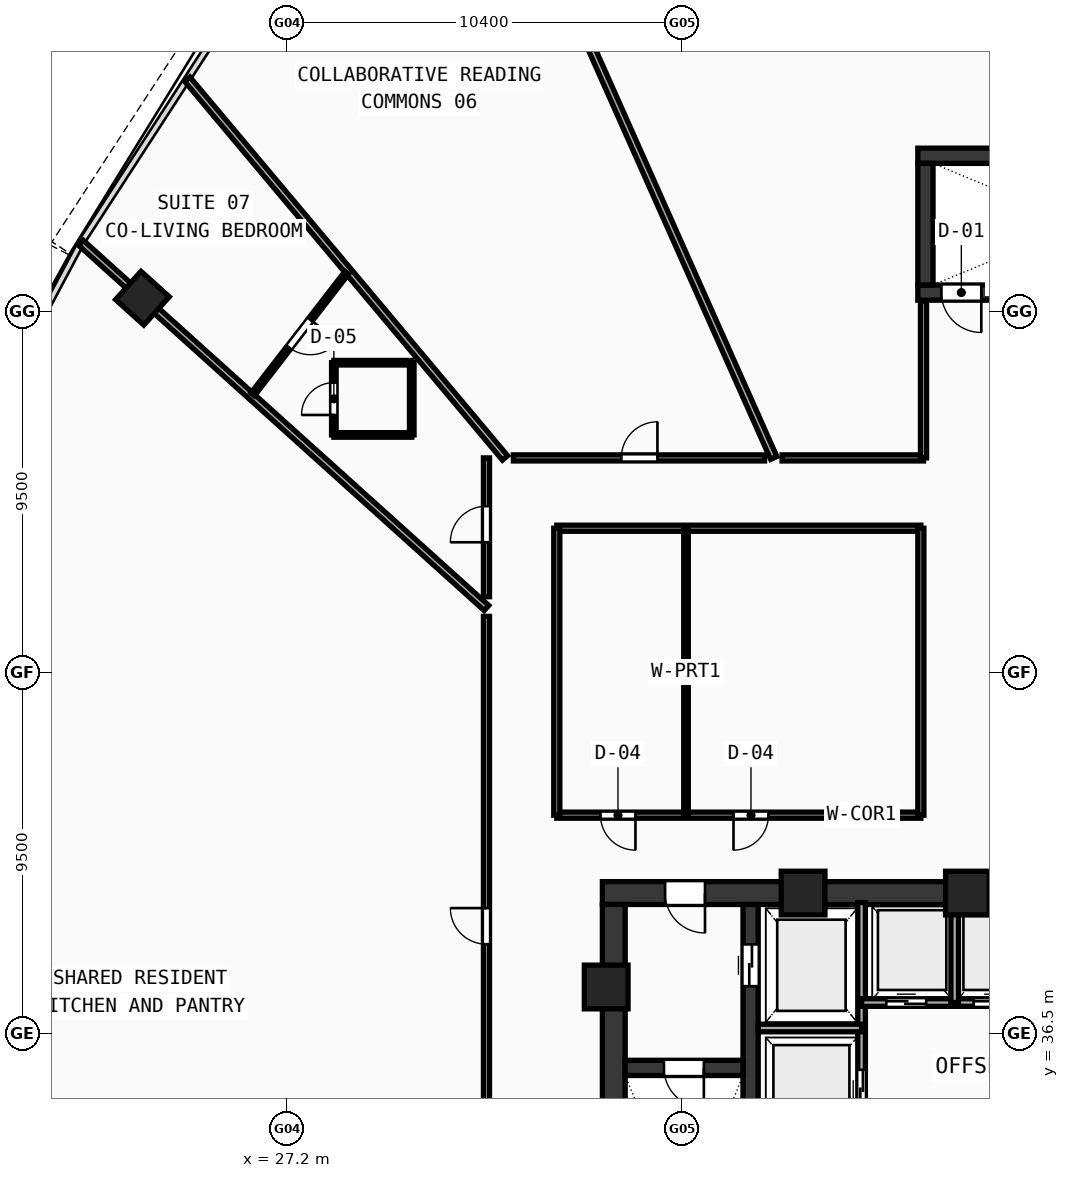
"""IFC4 building model, lengths in metres.
Left out: names, types, materials, properties, quantities, classifications, styles, units other than length and angle.
Written with IfcOpenShell. Run it as: python <this file> out.ifc"""

import sys

from ifc_helpers import new_model, si_unit, direction, frame, frame_2d, origin, origin_with_axes, origin_2d, place, context, subcontext, project, spatial, rectangle, hollow_rectangle, extrude, source, transform, mapped, element, fill, save


model = new_model("IFC4")
c1 = context("Model", 3, precision=1e-05, world=origin(), true_north=direction((0.0, 1.0)))
c2 = subcontext(c1, "Body", "Model", "MODEL_VIEW")
j1 = project(units=[si_unit("LENGTHUNIT", "METRE"), si_unit("PLANEANGLEUNIT", "RADIAN")], contexts=[c1])
p1 = place(None, origin())
s1 = spatial("IfcSite", under=j1, at=p1, CompositionType="ELEMENT")
p2 = place(p1, origin())
s2 = spatial("IfcBuilding", under=s1, at=p2, CompositionType="ELEMENT")
p3 = place(p2, frame((0.0, 0.0, 81.18)))
s3 = spatial("IfcBuildingStorey", under=s2, at=p3, CompositionType="ELEMENT", Elevation=81.18)
p4 = place(p3, frame((35.5, 40.2, 0.0), z_axis=(0.0, 0.0, 1.0), x_axis=(1.0, 0.0, 0.0)))
e1 = element("IfcWall", 1, at=p4, inside=s3, PredefinedType="SHEAR", context=c2, shape_type="SweptSolid", body=[
    extrude(rectangle(XDim=11.3, YDim=0.6, at=frame_2d((5.65, 0.0))), origin(), (0.0, 0.0, 1.0), 3.54),
])
p5 = place(p4, frame((1.65, 0.0, 0.0)))
e2 = element("IfcOpeningElement", 2, at=p5, cuts=e1, PredefinedType="OPENING", context=c2, shape_type="SweptSolid", body=[
    extrude(rectangle(XDim=1.05, YDim=2.1, at=frame_2d((0.525, 1.05))), frame((0.0, 0.31, 0.0), z_axis=(0.0, -1.0, 0.0), x_axis=(1.0, 0.0, 0.0)), (0.0, 0.0, 1.0), 0.62),
])
p6 = place(p3, frame((35.8, 27.8, 0.0), z_axis=(0.0, 0.0, 1.0), x_axis=(0.0, 1.0, 0.0)))
e3 = element("IfcWall", 3, at=p6, inside=s3, PredefinedType="SHEAR", context=c2, shape_type="SweptSolid", body=[
    extrude(rectangle(XDim=12.1, YDim=0.6, at=frame_2d((6.05, 0.0))), origin(), (0.0, 0.0, 1.0), 3.54),
])
p7 = place(p3, frame((39.4, 27.8, 0.0), z_axis=(0.0, 0.0, 1.0), x_axis=(0.0, 1.0, 0.0)))
e4 = element("IfcWall", 4, at=p7, inside=s3, PredefinedType="SHEAR", context=c2, shape_type="SweptSolid", body=[
    extrude(rectangle(XDim=12.1, YDim=0.4, at=frame_2d((6.05, 0.0))), origin(), (0.0, 0.0, 1.0), 3.54),
])
p8 = place(p7, frame((9.95, 0.0, 0.0)))
e5 = element("IfcOpeningElement", 5, at=p8, cuts=e4, PredefinedType="OPENING", context=c2, shape_type="SweptSolid", body=[
    extrude(rectangle(XDim=1.1, YDim=2.1, at=frame_2d((0.55, 1.05))), frame((0.0, 0.21, 0.0), z_axis=(0.0, -1.0, 0.0), x_axis=(1.0, 0.0, 0.0)), (0.0, 0.0, 1.0), 0.42),
])
p9 = place(p3, frame((36.1, 35.6, 0.0), z_axis=(0.0, 0.0, 1.0), x_axis=(1.0, 0.0, 0.0)))
e6 = element("IfcWall", 6, at=p9, inside=s3, PredefinedType="SHEAR", context=c2, shape_type="SweptSolid", body=[
    extrude(rectangle(XDim=3.1, YDim=0.4, at=frame_2d((1.55, 0.0))), origin(), (0.0, 0.0, 1.0), 3.54),
])
p10 = place(p9, frame((1.02, 0.0, 0.0)))
e7 = element("IfcOpeningElement", 7, at=p10, cuts=e6, PredefinedType="OPENING", context=c2, shape_type="SweptSolid", body=[
    extrude(rectangle(XDim=1.05, YDim=2.1, at=frame_2d((0.525, 1.05))), frame((0.0, 0.21, 0.0), z_axis=(0.0, -1.0, 0.0), x_axis=(1.0, 0.0, 0.0)), (0.0, 0.0, 1.0), 0.42),
])
p11 = place(p3, frame((43.8, 59.6, 0.0), z_axis=(0.0, 0.0, 1.0), x_axis=(1.0, 0.0, 0.0)))
e8 = element("IfcWall", 8, at=p11, inside=s3, PredefinedType="SHEAR", context=c2, shape_type="SweptSolid", body=[
    extrude(rectangle(XDim=8.5, YDim=0.4, at=frame_2d((4.25, 0.0))), origin(), (0.0, 0.0, 1.0), 3.54),
])
p12 = place(p3, frame((43.8, 56.0, 0.0), z_axis=(0.0, 0.0, 1.0), x_axis=(1.0, 0.0, 0.0)))
e9 = element("IfcWall", 9, at=p12, inside=s3, PredefinedType="SHEAR", context=c2, shape_type="SweptSolid", body=[
    extrude(rectangle(XDim=8.5, YDim=0.4, at=frame_2d((4.25, 0.0))), origin(), (0.0, 0.0, 1.0), 3.54),
])
p13 = place(p12, frame((0.62, 0.0, 0.0)))
e10 = element("IfcOpeningElement", 10, at=p13, cuts=e9, PredefinedType="OPENING", context=c2, shape_type="SweptSolid", body=[
    extrude(rectangle(XDim=1.05, YDim=2.1, at=frame_2d((0.525, 1.05))), frame((0.0, 0.21, 0.0), z_axis=(0.0, -1.0, 0.0), x_axis=(1.0, 0.0, 0.0)), (0.0, 0.0, 1.0), 0.42),
])
p14 = place(p3, frame((44.0, 56.2, 0.0), z_axis=(0.0, 0.0, 1.0), x_axis=(0.0, 1.0, 0.0)))
e11 = element("IfcWall", 11, at=p14, inside=s3, PredefinedType="SHEAR", context=c2, shape_type="SweptSolid", body=[
    extrude(rectangle(XDim=3.2, YDim=0.4, at=frame_2d((1.6, 0.0))), origin(), (0.0, 0.0, 1.0), 3.54),
])
m1 = source(origin(), c2, "Body", "SweptSolid", [
    extrude(hollow_rectangle(XDim=1.15, YDim=1.15, WallThickness=0.048, at=origin_2d()), origin(), (0.0, 0.0, 1.0), 3.8),
])
for number, where, z_axis, x_axis in (
    (12, (45.106, 40.2, -0.26), (0.0, 0.0, 1.0), (1.0, 0.0, 0.0)),
    (13, (40.781, 40.2, -0.26), (0.0, 0.0, 1.0), (1.0, 0.0, 0.0)),
    (14, (35.6, 37.729, -0.26), (0.0, 0.0, 1.0), (1.0, 0.0, 0.0)),
):
    element("IfcColumn", number, at=place(p3, frame(where, z_axis=z_axis, x_axis=x_axis)), inside=s3, PredefinedType="COLUMN", context=c2, shape_type="MappedRepresentation", body=[
        mapped(m1, transform((0.0, 0.0, 0.0), scale=1.0)),
    ])
m2 = source(origin(), c2, "Body", "SweptSolid", [
    extrude(hollow_rectangle(XDim=1.0, YDim=1.0, WallThickness=0.042, at=origin_2d()), origin(), (0.0, 0.0, 1.0), 3.8),
])
p15 = place(p3, frame((23.397, 55.852, -0.26), z_axis=(0.0, 0.0, 1.0), x_axis=(-0.669130606359, -0.743144825477, 0.0)))
e15 = element("IfcColumn", 15, at=p15, inside=s3, PredefinedType="COLUMN", context=c2, shape_type="MappedRepresentation", body=[
    mapped(m2, transform((0.0, 0.0, 0.0), scale=1.0)),
])
p16 = place(p3, frame((42.32, 33.5, 0.0), z_axis=(0.0, 0.0, 1.0), x_axis=(0.0, 1.0, 0.0)))
e16 = element("IfcWall", 16, at=p16, inside=s3, PredefinedType="SOLIDWALL", context=c2, shape_type="SweptSolid", body=[
    extrude(rectangle(XDim=6.45, YDim=0.2, at=frame_2d((3.225, 0.0))), origin(), (0.0, 0.0, 1.0), 3.54),
])
p17 = place(p16, frame((1.0, 0.0, 0.0)))
e17 = element("IfcOpeningElement", 17, at=p17, cuts=e16, PredefinedType="OPENING", context=c2, shape_type="SweptSolid", body=[
    extrude(rectangle(XDim=1.05, YDim=2.1, at=frame_2d((0.525, 1.05))), frame((0.0, 0.11, 0.0), z_axis=(0.0, -1.0, 0.0), x_axis=(1.0, 0.0, 0.0)), (0.0, 0.0, 1.0), 0.22),
])
p18 = place(p3, frame((39.6, 36.65, 0.0), z_axis=(0.0, 0.0, 1.0), x_axis=(1.0, 0.0, 0.0)))
e18 = element("IfcWall", 18, at=p18, inside=s3, PredefinedType="SOLIDWALL", context=c2, shape_type="SweptSolid", body=[
    extrude(rectangle(XDim=2.72, YDim=0.2, at=frame_2d((1.36, 0.0))), origin(), (0.0, 0.0, 1.0), 3.54),
])
p19 = place(p3, frame((42.32, 37.32, 0.0), z_axis=(0.0, 0.0, 1.0), x_axis=(1.0, 0.0, 0.0)))
e19 = element("IfcWall", 19, at=p19, inside=s3, PredefinedType="SOLIDWALL", context=c2, shape_type="SweptSolid", body=[
    extrude(rectangle(XDim=4.73, YDim=0.2, at=frame_2d((2.365, 0.0))), origin(), (0.0, 0.0, 1.0), 3.54),
])
p20 = place(p19, frame((0.65, 0.0, 0.0)))
e20 = element("IfcOpeningElement", 20, at=p20, cuts=e19, PredefinedType="OPENING", context=c2, shape_type="SweptSolid", body=[
    extrude(rectangle(XDim=1.05, YDim=2.1, at=frame_2d((0.525, 1.05))), frame((0.0, 0.11, 0.0), z_axis=(0.0, -1.0, 0.0), x_axis=(1.0, 0.0, 0.0)), (0.0, 0.0, 1.0), 0.22),
])
p21 = place(p19, frame((2.95, 0.0, 0.0)))
e21 = element("IfcOpeningElement", 21, at=p21, cuts=e19, PredefinedType="OPENING", context=c2, shape_type="SweptSolid", body=[
    extrude(rectangle(XDim=1.05, YDim=2.1, at=frame_2d((0.525, 1.05))), frame((0.0, 0.11, 0.0), z_axis=(0.0, -1.0, 0.0), x_axis=(1.0, 0.0, 0.0)), (0.0, 0.0, 1.0), 0.22),
])
p22 = place(p3, frame((44.77, 37.32, 0.0), z_axis=(0.0, 0.0, 1.0), x_axis=(0.0, 1.0, 0.0)))
e22 = element("IfcWall", 22, at=p22, inside=s3, PredefinedType="SOLIDWALL", context=c2, shape_type="SweptSolid", body=[
    extrude(rectangle(XDim=2.63, YDim=0.2, at=frame_2d((1.315, 0.0))), origin(), (0.0, 0.0, 1.0), 3.54),
])
p23 = place(p3, frame((34.3, 42.25, 0.0), z_axis=(0.0, 0.0, 1.0), x_axis=(1.0, 0.0, 0.0)))
e23 = element("IfcWall", 23, at=p23, inside=s3, PredefinedType="PARTITIONING", context=c2, shape_type="SweptSolid", body=[
    extrude(rectangle(XDim=9.58, YDim=0.16, at=frame_2d((4.79, 0.0))), origin(), (0.0, 0.0, 1.0), 2.84),
])
p24 = place(p23, frame((1.15, 0.0, 0.0)))
e24 = element("IfcOpeningElement", 24, at=p24, cuts=e23, PredefinedType="OPENING", context=c2, shape_type="SweptSolid", body=[
    extrude(rectangle(XDim=0.92, YDim=2.1, at=frame_2d((0.46, 1.05))), frame((0.0, 0.09, 0.0), z_axis=(0.0, -1.0, 0.0), x_axis=(1.0, 0.0, 0.0)), (0.0, 0.0, 1.0), 0.18),
])
p25 = place(p23, frame((4.65, 0.0, 0.0)))
e25 = element("IfcOpeningElement", 25, at=p25, cuts=e23, PredefinedType="OPENING", context=c2, shape_type="SweptSolid", body=[
    extrude(rectangle(XDim=0.92, YDim=2.1, at=frame_2d((0.46, 1.05))), frame((0.0, 0.09, 0.0), z_axis=(0.0, -1.0, 0.0), x_axis=(1.0, 0.0, 0.0)), (0.0, 0.0, 1.0), 0.18),
])
p26 = place(p3, frame((34.3, 49.8, 0.0), z_axis=(0.0, 0.0, 1.0), x_axis=(1.0, 0.0, 0.0)))
e26 = element("IfcWall", 26, at=p26, inside=s3, PredefinedType="PARTITIONING", context=c2, shape_type="SweptSolid", body=[
    extrude(rectangle(XDim=9.58, YDim=0.16, at=frame_2d((4.79, 0.0))), origin(), (0.0, 0.0, 1.0), 2.84),
])
for number, where, z_axis, x_axis in (
    (27, (34.3, 42.25, 0.0), (0.0, 0.0, 1.0), (0.0, 1.0, 0.0)),
    (28, (43.88, 42.25, 0.0), (0.0, 0.0, 1.0), (0.0, 1.0, 0.0)),
):
    element("IfcWall", number, at=place(p3, frame(where, z_axis=z_axis, x_axis=x_axis)), inside=s3, PredefinedType="PARTITIONING", context=c2, shape_type="SweptSolid", body=[
        extrude(rectangle(XDim=7.55, YDim=0.16, at=frame_2d((3.775, 0.0))), origin(), (0.0, 0.0, 1.0), 2.84),
    ])
p27 = place(p3, frame((37.7, 42.25, 0.0), z_axis=(0.0, 0.0, 1.0), x_axis=(0.0, 1.0, 0.0)))
e29 = element("IfcWall", 29, at=p27, inside=s3, PredefinedType="PARTITIONING", context=c2, shape_type="SweptSolid", body=[
    extrude(rectangle(XDim=7.55, YDim=0.12, at=frame_2d((3.775, 0.0))), origin(), (0.0, 0.0, 1.0), 2.84),
])
p28 = place(p3, frame((40.008, 51.65, 0.0), z_axis=(0.0, 0.0, 1.0), x_axis=(-0.406733854264, 0.913546699296, 0.0)))
e30 = element("IfcWall", 30, at=p28, inside=s3, PredefinedType="PARTITIONING", context=c2, shape_type="SweptSolid", body=[
    extrude(rectangle(XDim=21.911, YDim=0.18, at=frame_2d((10.956, 0.0))), origin(), (0.0, 0.0, 1.0), 2.84),
])
p29 = place(p3, frame((32.938, 51.65, 0.0), z_axis=(0.0, 0.0, 1.0), x_axis=(-0.642792408097, 0.766040416749, 0.0)))
e31 = element("IfcWall", 31, at=p29, inside=s3, PredefinedType="PARTITIONING", context=c2, shape_type="SweptSolid", body=[
    extrude(rectangle(XDim=13.01, YDim=0.18, at=frame_2d((6.505, 0.0))), origin(), (0.0, 0.0, 1.0), 2.84),
])
p30 = place(p3, frame((32.45, 47.701, 0.0), z_axis=(0.0, 0.0, 1.0), x_axis=(-0.743147852162, 0.66912724487, 0.0)))
e32 = element("IfcWall", 32, at=p30, inside=s3, PredefinedType="PARTITIONING", context=c2, shape_type="SweptSolid", body=[
    extrude(rectangle(XDim=14.357, YDim=0.18, at=frame_2d((7.179, 0.0))), origin(), (0.0, 0.0, 1.0), 2.84),
])
p31 = place(p3, frame((32.45, 31.178, 0.0), z_axis=(0.0, 0.0, 1.0), x_axis=(0.0, 1.0, 0.0)))
e33 = element("IfcWall", 33, at=p31, inside=s3, PredefinedType="PARTITIONING", context=c2, shape_type="SweptSolid", body=[
    extrude(rectangle(XDim=16.304, YDim=0.16, at=frame_2d((8.152, 0.0))), origin(), (0.0, 0.0, 1.0), 2.84),
])
p32 = place(p31, frame((7.677, 0.0, 0.0)))
e34 = element("IfcOpeningElement", 34, at=p32, cuts=e33, PredefinedType="OPENING", context=c2, shape_type="SweptSolid", body=[
    extrude(rectangle(XDim=0.95, YDim=2.1, at=frame_2d((0.475, 1.05))), frame((0.0, 0.09, 0.0), z_axis=(0.0, -1.0, 0.0), x_axis=(1.0, 0.0, 0.0)), (0.0, 0.0, 1.0), 0.18),
])
p33 = place(p3, frame((32.45, 47.997, 0.0), z_axis=(0.0, 0.0, 1.0), x_axis=(0.0, 1.0, 0.0)))
e35 = element("IfcWall", 35, at=p33, inside=s3, PredefinedType="PARTITIONING", context=c2, shape_type="SweptSolid", body=[
    extrude(rectangle(XDim=3.653, YDim=0.16, at=frame_2d((1.826, 0.0))), origin(), (0.0, 0.0, 1.0), 3.54),
])
p34 = place(p33, frame((1.433, 0.0, 0.0)))
e36 = element("IfcOpeningElement", 36, at=p34, cuts=e35, PredefinedType="OPENING", context=c2, shape_type="SweptSolid", body=[
    extrude(rectangle(XDim=0.95, YDim=2.1, at=frame_2d((0.475, 1.05))), frame((0.0, 0.09, 0.0), z_axis=(0.0, -1.0, 0.0), x_axis=(1.0, 0.0, 0.0)), (0.0, 0.0, 1.0), 0.18),
])
p35 = place(p3, frame((33.158, 51.65, 0.0), z_axis=(0.0, 0.0, 1.0), x_axis=(1.0, 0.0, 0.0)))
e37 = element("IfcWall", 37, at=p35, inside=s3, PredefinedType="PARTITIONING", context=c2, shape_type="SweptSolid", body=[
    extrude(rectangle(XDim=6.609, YDim=0.16, at=frame_2d((3.305, 0.0))), origin(), (0.0, 0.0, 1.0), 3.54),
])
p36 = place(p35, frame((2.84, 0.0, 0.0)))
e38 = element("IfcOpeningElement", 38, at=p36, cuts=e37, PredefinedType="OPENING", context=c2, shape_type="SweptSolid", body=[
    extrude(rectangle(XDim=0.95, YDim=2.1, at=frame_2d((0.475, 1.05))), frame((0.0, 0.09, 0.0), z_axis=(0.0, -1.0, 0.0), x_axis=(1.0, 0.0, 0.0)), (0.0, 0.0, 1.0), 0.18),
])
p37 = place(p3, frame((40.228, 51.65, 0.0), z_axis=(0.0, 0.0, 1.0), x_axis=(1.0, 0.0, 0.0)))
e39 = element("IfcWall", 39, at=p37, inside=s3, PredefinedType="PARTITIONING", context=c2, shape_type="SweptSolid", body=[
    extrude(rectangle(XDim=3.722, YDim=0.16, at=frame_2d((1.861, 0.0))), origin(), (0.0, 0.0, 1.0), 2.84),
])
p38 = place(p3, frame((43.95, 51.65, 0.0), z_axis=(0.0, 0.0, 1.0), x_axis=(0.0, 1.0, 0.0)))
e40 = element("IfcWall", 40, at=p38, inside=s3, PredefinedType="PARTITIONING", context=c2, shape_type="SweptSolid", body=[
    extrude(rectangle(XDim=4.13, YDim=0.16, at=frame_2d((2.065, 0.0))), origin(), (0.0, 0.0, 1.0), 3.54),
])
p39 = place(p3, frame((28.434, 52.255, 0.0), z_axis=(0.0, 0.0, 1.0), x_axis=(1.0, 0.0, 0.0)))
e41 = element("IfcWall", 41, at=p39, inside=s3, PredefinedType="PARTITIONING", context=c2, shape_type="SweptSolid", body=[
    extrude(rectangle(XDim=2.05, YDim=0.12, at=frame_2d((1.025, 0.0))), origin(), (0.0, 0.0, 1.0), 3.14),
])
p40 = place(p3, frame((30.484, 52.255, 0.0), z_axis=(0.0, 0.0, 1.0), x_axis=(0.0, 1.0, 0.0)))
e42 = element("IfcWall", 42, at=p40, inside=s3, PredefinedType="PARTITIONING", context=c2, shape_type="SweptSolid", body=[
    extrude(rectangle(XDim=1.9, YDim=0.12, at=frame_2d((0.95, 0.0))), origin(), (0.0, 0.0, 1.0), 3.14),
])
p41 = place(p3, frame((30.484, 54.155, 0.0), z_axis=(0.0, 0.0, 1.0), x_axis=(-1.0, 0.0, 0.0)))
e43 = element("IfcWall", 43, at=p41, inside=s3, PredefinedType="PARTITIONING", context=c2, shape_type="SweptSolid", body=[
    extrude(rectangle(XDim=2.05, YDim=0.12, at=frame_2d((1.025, 0.0))), origin(), (0.0, 0.0, 1.0), 3.54),
])
p42 = place(p3, frame((28.434, 54.155, 0.0), z_axis=(0.0, 0.0, 1.0), x_axis=(0.0, -1.0, 0.0)))
e44 = element("IfcWall", 44, at=p42, inside=s3, PredefinedType="PARTITIONING", context=c2, shape_type="SweptSolid", body=[
    extrude(rectangle(XDim=1.9, YDim=0.12, at=frame_2d((0.95, 0.0))), origin(), (0.0, 0.0, 1.0), 3.54),
])
p43 = place(p42, frame((0.525, 0.0, 0.0)))
e45 = element("IfcOpeningElement", 45, at=p43, cuts=e44, PredefinedType="OPENING", context=c2, shape_type="SweptSolid", body=[
    extrude(rectangle(XDim=0.85, YDim=2.1, at=frame_2d((0.425, 1.05))), frame((0.0, 0.07, 0.0), z_axis=(0.0, -1.0, 0.0), x_axis=(1.0, 0.0, 0.0)), (0.0, 0.0, 1.0), 0.14),
])
p44 = place(p3, frame((28.772, 56.521, 0.0), z_axis=(0.0, 0.0, 1.0), x_axis=(-0.611610665825, -0.791158892669, 0.0)))
e46 = element("IfcWall", 46, at=p44, inside=s3, PredefinedType="PARTITIONING", context=c2, shape_type="SweptSolid", body=[
    extrude(rectangle(XDim=4.045, YDim=0.12, at=frame_2d((2.022, 0.0))), origin(), (0.0, 0.0, 1.0), 2.84),
])
p45 = place(p44, frame((1.562, 0.0, 0.0)))
e47 = element("IfcOpeningElement", 47, at=p45, cuts=e46, PredefinedType="OPENING", context=c2, shape_type="SweptSolid", body=[
    extrude(rectangle(XDim=0.92, YDim=2.1, at=frame_2d((0.46, 1.05))), frame((0.0, 0.07, 0.0), z_axis=(0.0, -1.0, 0.0), x_axis=(1.0, 0.0, 0.0)), (0.0, 0.0, 1.0), 0.14),
])
m3 = source(origin(), c2, "Body", "SweptSolid", [
    extrude(rectangle(XDim=1.05, YDim=2.1, at=frame_2d((0.525, 1.05))), frame((0.0, 0.025, 0.0), z_axis=(0.0, -1.0, 0.0), x_axis=(1.0, 0.0, 0.0)), (0.0, 0.0, 1.0), 0.05),
])
p46 = place(p10, frame((1.05, 0.0, 0.0), z_axis=(0.0, 0.0, 1.0), x_axis=(-1.0, 0.0, 0.0)))
e48 = element("IfcDoor", 48, at=p46, inside=s3, OperationType="SINGLE_SWING_LEFT", PredefinedType="DOOR", context=c2, shape_type="MappedRepresentation", body=[
    mapped(m3, transform((0.0, 0.0, 0.0), scale=1.0)),
])
fill(e7, e48)
p47 = place(p5, frame((1.05, 0.0, 0.0), z_axis=(0.0, 0.0, 1.0), x_axis=(-1.0, 0.0, 0.0)))
e49 = element("IfcDoor", 49, at=p47, inside=s3, OperationType="SINGLE_SWING_LEFT", PredefinedType="DOOR", context=c2, shape_type="MappedRepresentation", body=[
    mapped(m3, transform((0.0, 0.0, 0.0), scale=1.0)),
])
fill(e2, e49)
m4 = source(origin(), c2, "Body", "SweptSolid", [
    extrude(rectangle(XDim=1.1, YDim=2.1, at=frame_2d((0.55, 1.05))), frame((0.0, 0.025, 0.0), z_axis=(0.0, -1.0, 0.0), x_axis=(1.0, 0.0, 0.0)), (0.0, 0.0, 1.0), 0.05),
])
p48 = place(p8, frame((1.1, 0.0, 0.0), z_axis=(0.0, 0.0, 1.0), x_axis=(-1.0, 0.0, 0.0)))
e50 = element("IfcDoor", 50, at=p48, inside=s3, OperationType="DOUBLE_DOOR_SLIDING", PredefinedType="DOOR", context=c2, shape_type="MappedRepresentation", body=[
    mapped(m4, transform((0.0, 0.0, 0.0), scale=1.0)),
])
fill(e5, e50)
p49 = place(p17, origin_with_axes())
e51 = element("IfcDoor", 51, at=p49, inside=s3, OperationType="DOUBLE_DOOR_SLIDING", PredefinedType="DOOR", context=c2, shape_type="MappedRepresentation", body=[
    mapped(m3, transform((0.0, 0.0, 0.0), scale=1.0)),
])
fill(e17, e51)
p50 = place(p20, frame((1.05, 0.0, 0.0), z_axis=(0.0, 0.0, 1.0), x_axis=(-1.0, 0.0, 0.0)))
e52 = element("IfcDoor", 52, at=p50, inside=s3, OperationType="DOUBLE_DOOR_SLIDING", PredefinedType="DOOR", context=c2, shape_type="MappedRepresentation", body=[
    mapped(m3, transform((0.0, 0.0, 0.0), scale=1.0)),
])
fill(e20, e52)
p51 = place(p21, frame((1.05, 0.0, 0.0), z_axis=(0.0, 0.0, 1.0), x_axis=(-1.0, 0.0, 0.0)))
e53 = element("IfcDoor", 53, at=p51, inside=s3, OperationType="DOUBLE_DOOR_SLIDING", PredefinedType="DOOR", context=c2, shape_type="MappedRepresentation", body=[
    mapped(m3, transform((0.0, 0.0, 0.0), scale=1.0)),
])
fill(e21, e53)
p52 = place(p13, frame((1.05, 0.0, 0.0), z_axis=(0.0, 0.0, 1.0), x_axis=(-1.0, 0.0, 0.0)))
e54 = element("IfcDoor", 54, at=p52, inside=s3, OperationType="SINGLE_SWING_LEFT", PredefinedType="DOOR", context=c2, shape_type="MappedRepresentation", body=[
    mapped(m3, transform((0.0, 0.0, 0.0), scale=1.0)),
])
fill(e10, e54)
m5 = source(origin(), c2, "Body", "SweptSolid", [
    extrude(rectangle(XDim=0.92, YDim=2.1, at=frame_2d((0.46, 1.05))), frame((0.0, 0.025, 0.0), z_axis=(0.0, -1.0, 0.0), x_axis=(1.0, 0.0, 0.0)), (0.0, 0.0, 1.0), 0.05),
])
p53 = place(p24, frame((0.92, 0.0, 0.0), z_axis=(0.0, 0.0, 1.0), x_axis=(-1.0, 0.0, 0.0)))
e55 = element("IfcDoor", 55, at=p53, inside=s3, OperationType="SINGLE_SWING_LEFT", PredefinedType="DOOR", context=c2, shape_type="MappedRepresentation", body=[
    mapped(m5, transform((0.0, 0.0, 0.0), scale=1.0)),
])
fill(e24, e55)
p54 = place(p25, frame((0.92, 0.0, 0.0), z_axis=(0.0, 0.0, 1.0), x_axis=(-1.0, 0.0, 0.0)))
e56 = element("IfcDoor", 56, at=p54, inside=s3, OperationType="SINGLE_SWING_RIGHT", PredefinedType="DOOR", context=c2, shape_type="MappedRepresentation", body=[
    mapped(m5, transform((0.0, 0.0, 0.0), scale=1.0)),
])
fill(e25, e56)
m6 = source(origin(), c2, "Body", "SweptSolid", [
    extrude(rectangle(XDim=0.95, YDim=2.1, at=frame_2d((0.475, 1.05))), frame((0.0, 0.025, 0.0), z_axis=(0.0, -1.0, 0.0), x_axis=(1.0, 0.0, 0.0)), (0.0, 0.0, 1.0), 0.05),
])
p55 = place(p36, origin_with_axes())
e57 = element("IfcDoor", 57, at=p55, inside=s3, OperationType="SINGLE_SWING_RIGHT", PredefinedType="DOOR", context=c2, shape_type="MappedRepresentation", body=[
    mapped(m6, transform((0.0, 0.0, 0.0), scale=1.0)),
])
fill(e38, e57)
p56 = place(p34, origin_with_axes())
e58 = element("IfcDoor", 58, at=p56, inside=s3, OperationType="SINGLE_SWING_LEFT", PredefinedType="DOOR", context=c2, shape_type="MappedRepresentation", body=[
    mapped(m6, transform((0.0, 0.0, 0.0), scale=1.0)),
])
fill(e36, e58)
m7 = source(origin(), c2, "Body", "SweptSolid", [
    extrude(rectangle(XDim=0.85, YDim=2.1, at=frame_2d((0.425, 1.05))), frame((0.0, 0.025, 0.0), z_axis=(0.0, -1.0, 0.0), x_axis=(1.0, 0.0, 0.0)), (0.0, 0.0, 1.0), 0.05),
])
p57 = place(p43, frame((0.85, 0.0, 0.0), z_axis=(0.0, 0.0, 1.0), x_axis=(-1.0, 0.0, 0.0)))
e59 = element("IfcDoor", 59, at=p57, inside=s3, OperationType="SINGLE_SWING_LEFT", PredefinedType="DOOR", context=c2, shape_type="MappedRepresentation", body=[
    mapped(m7, transform((0.0, 0.0, 0.0), scale=1.0)),
])
fill(e45, e59)
p58 = place(p45, origin_with_axes())
e60 = element("IfcDoor", 60, at=p58, inside=s3, OperationType="SINGLE_SWING_LEFT", PredefinedType="DOOR", context=c2, shape_type="MappedRepresentation", body=[
    mapped(m5, transform((0.0, 0.0, 0.0), scale=1.0)),
])
fill(e47, e60)
p59 = place(p32, origin_with_axes())
e61 = element("IfcDoor", 61, at=p59, inside=s3, OperationType="SINGLE_SWING_RIGHT", PredefinedType="DOOR", context=c2, shape_type="MappedRepresentation", body=[
    mapped(m6, transform((0.0, 0.0, 0.0), scale=1.0)),
])
fill(e34, e61)
save(model, sys.argv[1])
